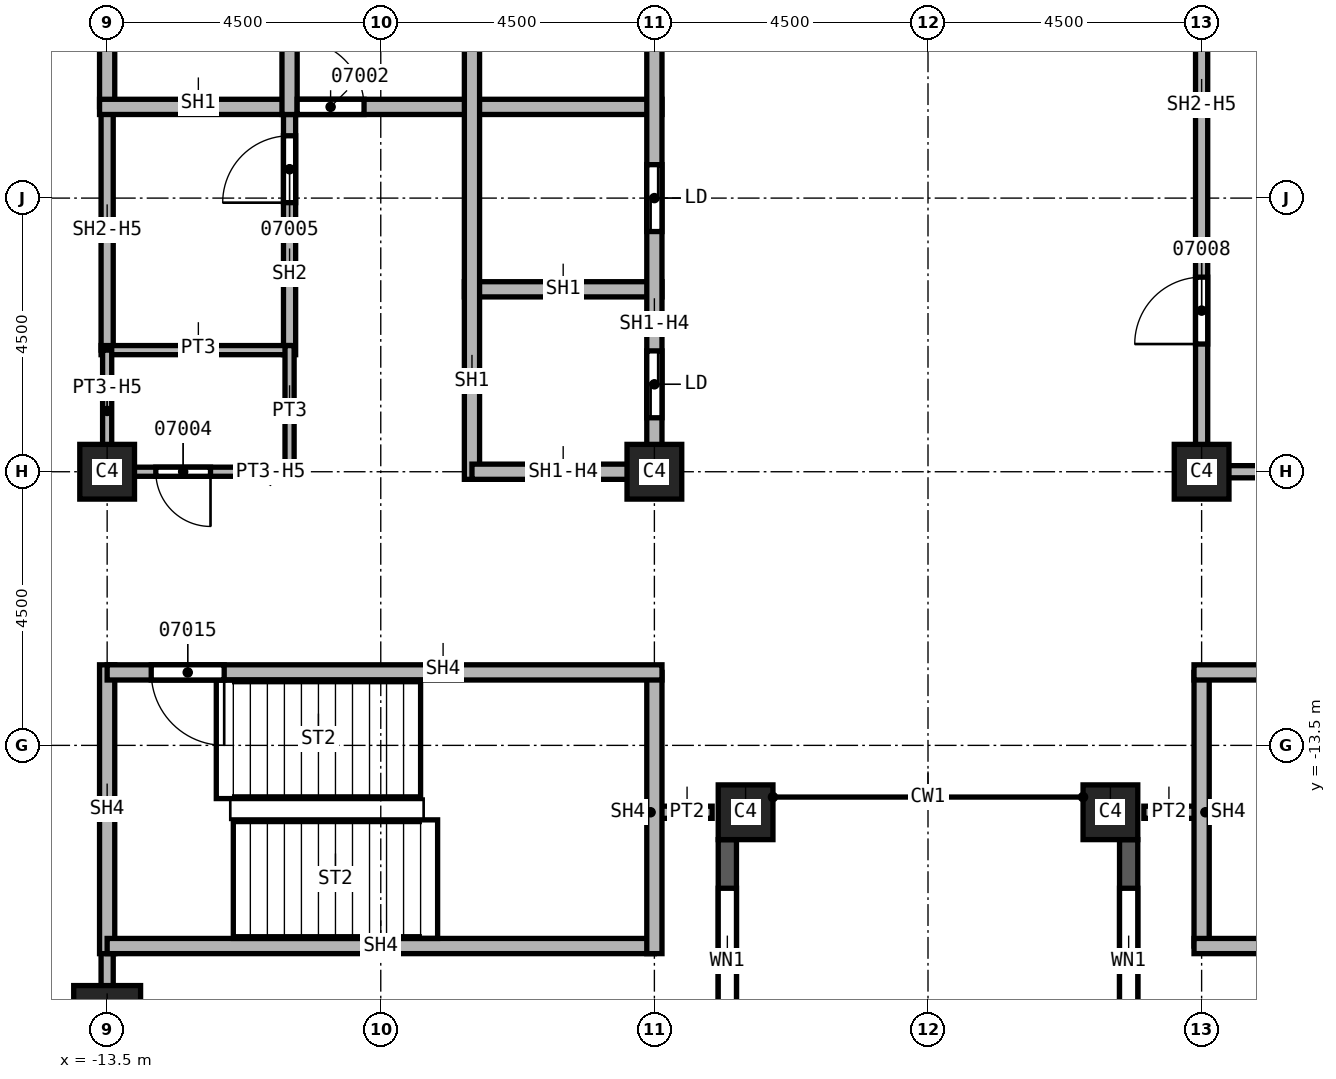
"""IFC4 building model, lengths in metres.
Left out: names, types, materials, properties, quantities, classifications, styles, units other than length and angle.
Written with IfcOpenShell. Run it as: python <this file> out.ifc"""

import sys

from ifc_helpers import new_model, si_unit, direction, frame, frame_2d, origin, origin_2d, place, context, subcontext, project, spatial, rectangle, extrude, element, fill, save


model = new_model("IFC4")
c1 = context("Model", 3, precision=1e-05, world=origin(), true_north=direction((0.0, 1.0)))
c2 = subcontext(c1, "Body", "Model", "MODEL_VIEW")
j1 = project(units=[si_unit("LENGTHUNIT", "METRE"), si_unit("PLANEANGLEUNIT", "RADIAN")], contexts=[c1])
p1 = place(None, origin())
s1 = spatial("IfcSite", under=j1, at=p1, CompositionType="ELEMENT")
p2 = place(p1, origin())
s2 = spatial("IfcBuilding", under=s1, at=p2, CompositionType="ELEMENT")
p3 = place(p2, frame((0.0, 0.0, 138.0)))
s3 = spatial("IfcBuildingStorey", under=s2, at=p3, CompositionType="ELEMENT", Elevation=138.0)
p4 = place(p3, frame((-13.5, -18.0, 0.0), z_axis=(0.0, 0.0, 1.0), x_axis=(1.0, 0.0, 0.0)))
e1 = element("IfcColumn", 1, at=p4, inside=s3, PredefinedType="COLUMN", context=c2, shape_type="SweptSolid", body=[
    extrude(rectangle(XDim=1.1, YDim=1.1, at=origin_2d()), origin(), (0.0, 0.0, 1.0), 3.7),
])
for number, where, z_axis, x_axis in (
    (2, (4.5, -9.0, 0.0), (0.0, 0.0, 1.0), (1.0, 0.0, 0.0)),
    (3, (-4.5, -9.0, 0.0), (0.0, 0.0, 1.0), (1.0, 0.0, 0.0)),
    (4, (-13.5, -9.0, 0.0), (0.0, 0.0, 1.0), (1.0, 0.0, 0.0)),
    (5, (3.0, -14.6, 0.0), (0.0, 0.0, 1.0), (1.0, 0.0, 0.0)),
    (6, (-3.0, -14.6, 0.0), (0.0, 0.0, 1.0), (1.0, 0.0, 0.0)),
):
    element("IfcColumn", number, at=place(p3, frame(where, z_axis=z_axis, x_axis=x_axis)), inside=s3, PredefinedType="COLUMN", context=c2, shape_type="SweptSolid", body=[
        extrude(rectangle(XDim=0.9, YDim=0.9, at=origin_2d()), origin(), (0.0, 0.0, 1.0), 3.7),
    ])
p5 = place(p3, frame((-3.3, -23.05, 0.0), z_axis=(0.0, 0.0, 1.0), x_axis=(0.0, 1.0, 0.0)))
e7 = element("IfcWall", 7, at=p5, inside=s3, PredefinedType="SOLIDWALL", context=c2, shape_type="SweptSolid", body=[
    extrude(rectangle(XDim=8.0, YDim=0.3, at=frame_2d((4.0, 0.0))), origin(), (0.0, 0.0, 1.0), 3.1),
])
p6 = place(p5, frame((0.8, 0.0, 0.8)))
e8 = element("IfcOpeningElement", 8, at=p6, cuts=e7, PredefinedType="OPENING", context=c2, shape_type="SweptSolid", body=[
    extrude(rectangle(XDim=2.4, YDim=1.95, at=frame_2d((1.2, 0.975))), frame((0.0, 0.15, 0.0), z_axis=(0.0, -1.0, 0.0), x_axis=(1.0, 0.0, 0.0)), (0.0, 0.0, 1.0), 0.3),
])
p7 = place(p5, frame((4.8, 0.0, 0.8)))
e9 = element("IfcOpeningElement", 9, at=p7, cuts=e7, PredefinedType="OPENING", context=c2, shape_type="SweptSolid", body=[
    extrude(rectangle(XDim=2.4, YDim=1.95, at=frame_2d((1.2, 0.975))), frame((0.0, 0.15, 0.0), z_axis=(0.0, -1.0, 0.0), x_axis=(1.0, 0.0, 0.0)), (0.0, 0.0, 1.0), 0.3),
])
p8 = place(p3, frame((3.3, -15.05, 0.0), z_axis=(0.0, 0.0, 1.0), x_axis=(0.0, -1.0, 0.0)))
e10 = element("IfcWall", 10, at=p8, inside=s3, PredefinedType="SOLIDWALL", context=c2, shape_type="SweptSolid", body=[
    extrude(rectangle(XDim=8.0, YDim=0.3, at=frame_2d((4.0, 0.0))), origin(), (0.0, 0.0, 1.0), 3.1),
])
p9 = place(p8, frame((0.8, 0.0, 0.8)))
e11 = element("IfcOpeningElement", 11, at=p9, cuts=e10, PredefinedType="OPENING", context=c2, shape_type="SweptSolid", body=[
    extrude(rectangle(XDim=2.4, YDim=1.95, at=frame_2d((1.2, 0.975))), frame((0.0, 0.15, 0.0), z_axis=(0.0, -1.0, 0.0), x_axis=(1.0, 0.0, 0.0)), (0.0, 0.0, 1.0), 0.3),
])
p10 = place(p8, frame((4.8, 0.0, 0.8)))
e12 = element("IfcOpeningElement", 12, at=p10, cuts=e10, PredefinedType="OPENING", context=c2, shape_type="SweptSolid", body=[
    extrude(rectangle(XDim=2.4, YDim=1.95, at=frame_2d((1.2, 0.975))), frame((0.0, 0.15, 0.0), z_axis=(0.0, -1.0, 0.0), x_axis=(1.0, 0.0, 0.0)), (0.0, 0.0, 1.0), 0.3),
])
p11 = place(p3, frame((-13.5, -16.675, 0.0), z_axis=(0.0, 0.0, 1.0), x_axis=(0.0, -1.0, 0.0)))
e13 = element("IfcWall", 13, at=p11, inside=s3, PredefinedType="PARTITIONING", context=c2, shape_type="SweptSolid", body=[
    extrude(rectangle(XDim=6.375, YDim=0.2, at=frame_2d((3.188, 0.0))), origin(), (0.0, 0.0, 1.0), 3.7),
])
p12 = place(p11, frame((2.65, 0.0, 0.0)))
e14 = element("IfcOpeningElement", 14, at=p12, cuts=e13, PredefinedType="OPENING", context=c2, shape_type="SweptSolid", body=[
    extrude(rectangle(XDim=1.0, YDim=2.1, at=frame_2d((0.5, 1.05))), frame((0.0, 0.1, 0.0), z_axis=(0.0, -1.0, 0.0), x_axis=(1.0, 0.0, 0.0)), (0.0, 0.0, 1.0), 0.2),
])
for number, where, z_axis, x_axis in (
    (15, (-3.55, -14.6, 0.0), (0.0, 0.0, 1.0), (-1.0, 0.0, 0.0)),
    (16, (4.5, -14.6, 0.0), (0.0, 0.0, 1.0), (-1.0, 0.0, 0.0)),
):
    element("IfcWall", number, at=place(p3, frame(where, z_axis=z_axis, x_axis=x_axis)), inside=s3, PredefinedType="PARTITIONING", context=c2, shape_type="SweptSolid", body=[
        extrude(rectangle(XDim=0.95, YDim=0.2, at=frame_2d((0.475, 0.0))), origin(), (0.0, 0.0, 1.0), 3.7),
    ])
p13 = place(p3, frame((-13.5, -7.0, 0.0), z_axis=(0.0, 0.0, 1.0), x_axis=(0.0, 1.0, 0.0)))
e17 = element("IfcWall", 17, at=p13, inside=s3, PredefinedType="SOLIDWALL", context=c2, shape_type="SweptSolid", body=[
    extrude(rectangle(XDim=4.0, YDim=0.2, at=frame_2d((2.0, 0.0))), origin(), (0.0, 0.0, 1.0), 2.938),
])
p14 = place(p3, frame((-10.5, -7.075, 0.0), z_axis=(0.0, 0.0, 1.0), x_axis=(0.0, 1.0, 0.0)))
e18 = element("IfcWall", 18, at=p14, inside=s3, PredefinedType="SOLIDWALL", context=c2, shape_type="SweptSolid", body=[
    extrude(rectangle(XDim=4.2, YDim=0.2, at=frame_2d((2.1, 0.0))), origin(), (0.0, 0.0, 1.0), 3.7),
])
p15 = place(p14, frame((2.5, 0.0, 0.0)))
e19 = element("IfcOpeningElement", 19, at=p15, cuts=e18, PredefinedType="OPENING", context=c2, shape_type="SweptSolid", body=[
    extrude(rectangle(XDim=1.1, YDim=2.1, at=frame_2d((0.55, 1.05))), frame((0.0, 0.1, 0.0), z_axis=(0.0, -1.0, 0.0), x_axis=(1.0, 0.0, 0.0)), (0.0, 0.0, 1.0), 0.2),
])
p16 = place(p3, frame((4.5, -9.1, 0.0), z_axis=(0.0, 0.0, 1.0), x_axis=(0.0, 1.0, 0.0)))
e20 = element("IfcWall", 20, at=p16, inside=s3, PredefinedType="SOLIDWALL", context=c2, shape_type="SweptSolid", body=[
    extrude(rectangle(XDim=9.1, YDim=0.2, at=frame_2d((4.55, 0.0))), origin(), (0.0, 0.0, 1.0), 2.938),
])
p17 = place(p16, frame((2.2, 0.0, 0.0)))
e21 = element("IfcOpeningElement", 21, at=p17, cuts=e20, PredefinedType="OPENING", context=c2, shape_type="SweptSolid", body=[
    extrude(rectangle(XDim=1.1, YDim=2.1, at=frame_2d((0.55, 1.05))), frame((0.0, 0.1, 0.0), z_axis=(0.0, -1.0, 0.0), x_axis=(1.0, 0.0, 0.0)), (0.0, 0.0, 1.0), 0.2),
])
p18 = place(p3, frame((7.5, -9.0, 0.0), z_axis=(0.0, 0.0, 1.0), x_axis=(-1.0, 0.0, 0.0)))
e22 = element("IfcWall", 22, at=p18, inside=s3, PredefinedType="SOLIDWALL", context=c2, shape_type="SweptSolid", body=[
    extrude(rectangle(XDim=3.0, YDim=0.2, at=frame_2d((1.5, 0.0))), origin(), (0.0, 0.0, 1.0), 2.938),
])
p19 = place(p3, frame((-13.5, -3.0, 0.0), z_axis=(0.0, 0.0, 1.0), x_axis=(0.0, 1.0, 0.0)))
e23 = element("IfcWall", 23, at=p19, inside=s3, PredefinedType="SOLIDWALL", context=c2, shape_type="SweptSolid", body=[
    extrude(rectangle(XDim=6.0, YDim=0.25, at=frame_2d((3.0, 0.0))), origin(), (0.0, 0.0, 1.0), 2.938),
])
p20 = place(p3, frame((-13.625, -3.0, 0.0), z_axis=(0.0, 0.0, 1.0), x_axis=(1.0, 0.0, 0.0)))
e24 = element("IfcWall", 24, at=p20, inside=s3, PredefinedType="SOLIDWALL", context=c2, shape_type="SweptSolid", body=[
    extrude(rectangle(XDim=9.25, YDim=0.25, at=frame_2d((4.625, 0.0))), origin(), (0.0, 0.0, 1.0), 3.7),
])
p21 = place(p20, frame((3.25, 0.0, 0.0)))
e25 = element("IfcOpeningElement", 25, at=p21, cuts=e24, PredefinedType="OPENING", context=c2, shape_type="SweptSolid", body=[
    extrude(rectangle(XDim=1.1, YDim=2.1, at=frame_2d((0.55, 1.05))), frame((0.0, 0.125, 0.0), z_axis=(0.0, -1.0, 0.0), x_axis=(1.0, 0.0, 0.0)), (0.0, 0.0, 1.0), 0.25),
])
p22 = place(p3, frame((-10.5, -3.125, 0.0), z_axis=(0.0, 0.0, 1.0), x_axis=(0.0, 1.0, 0.0)))
e26 = element("IfcWall", 26, at=p22, inside=s3, PredefinedType="SOLIDWALL", context=c2, shape_type="SweptSolid", body=[
    extrude(rectangle(XDim=6.25, YDim=0.25, at=frame_2d((3.125, 0.0))), origin(), (0.0, 0.0, 1.0), 3.7),
])
p23 = place(p22, frame((1.075, 0.0, 0.0)))
e27 = element("IfcOpeningElement", 27, at=p23, cuts=e26, PredefinedType="OPENING", context=c2, shape_type="SweptSolid", body=[
    extrude(rectangle(XDim=1.1, YDim=2.1, at=frame_2d((0.55, 1.05))), frame((0.0, 0.125, 0.0), z_axis=(0.0, -1.0, 0.0), x_axis=(1.0, 0.0, 0.0)), (0.0, 0.0, 1.0), 0.25),
])
p24 = place(p22, frame((4.075, 0.0, 0.0)))
e28 = element("IfcOpeningElement", 28, at=p24, cuts=e26, PredefinedType="OPENING", context=c2, shape_type="SweptSolid", body=[
    extrude(rectangle(XDim=1.1, YDim=2.1, at=frame_2d((0.55, 1.05))), frame((0.0, 0.125, 0.0), z_axis=(0.0, -1.0, 0.0), x_axis=(1.0, 0.0, 0.0)), (0.0, 0.0, 1.0), 0.25),
])
p25 = place(p3, frame((-7.625, -6.0, 0.0), z_axis=(0.0, 0.0, 1.0), x_axis=(1.0, 0.0, 0.0)))
e29 = element("IfcWall", 29, at=p25, inside=s3, PredefinedType="SOLIDWALL", context=c2, shape_type="SweptSolid", body=[
    extrude(rectangle(XDim=3.25, YDim=0.25, at=frame_2d((1.625, 0.0))), origin(), (0.0, 0.0, 1.0), 3.7),
])
p26 = place(p3, frame((-7.5, -9.125, 0.0), z_axis=(0.0, 0.0, 1.0), x_axis=(0.0, 1.0, 0.0)))
e30 = element("IfcWall", 30, at=p26, inside=s3, PredefinedType="SOLIDWALL", context=c2, shape_type="SweptSolid", body=[
    extrude(rectangle(XDim=12.25, YDim=0.25, at=frame_2d((6.125, 0.0))), origin(), (0.0, 0.0, 1.0), 3.7),
])
p27 = place(p3, frame((-4.5, -9.0, 0.0), z_axis=(0.0, 0.0, 1.0), x_axis=(-1.0, 0.0, 0.0)))
e31 = element("IfcWall", 31, at=p27, inside=s3, PredefinedType="SOLIDWALL", context=c2, shape_type="SweptSolid", body=[
    extrude(rectangle(XDim=3.0, YDim=0.25, at=frame_2d((1.5, 0.0))), origin(), (0.0, 0.0, 1.0), 2.938),
])
p28 = place(p3, frame((-4.5, 0.0, 0.0), z_axis=(0.0, 0.0, 1.0), x_axis=(0.0, -1.0, 0.0)))
e32 = element("IfcWall", 32, at=p28, inside=s3, PredefinedType="SOLIDWALL", context=c2, shape_type="SweptSolid", body=[
    extrude(rectangle(XDim=9.125, YDim=0.25, at=frame_2d((4.562, 0.0))), origin(), (0.0, 0.0, 1.0), 2.938),
])
p29 = place(p28, frame((7.012, 0.0, 0.0)))
e33 = element("IfcOpeningElement", 33, at=p29, cuts=e32, PredefinedType="OPENING", context=c2, shape_type="SweptSolid", body=[
    extrude(rectangle(XDim=1.1, YDim=2.1, at=frame_2d((0.55, 1.05))), frame((0.0, 0.125, 0.0), z_axis=(0.0, -1.0, 0.0), x_axis=(1.0, 0.0, 0.0)), (0.0, 0.0, 1.0), 0.25),
])
p30 = place(p28, frame((3.95, 0.0, 0.0)))
e34 = element("IfcOpeningElement", 34, at=p30, cuts=e32, PredefinedType="OPENING", context=c2, shape_type="SweptSolid", body=[
    extrude(rectangle(XDim=1.1, YDim=2.1, at=frame_2d((0.55, 1.05))), frame((0.0, 0.125, 0.0), z_axis=(0.0, -1.0, 0.0), x_axis=(1.0, 0.0, 0.0)), (0.0, 0.0, 1.0), 0.25),
])
p31 = place(p28, frame((0.95, 0.0, 0.0)))
e35 = element("IfcOpeningElement", 35, at=p31, cuts=e32, PredefinedType="OPENING", context=c2, shape_type="SweptSolid", body=[
    extrude(rectangle(XDim=1.1, YDim=2.1, at=frame_2d((0.55, 1.05))), frame((0.0, 0.125, 0.0), z_axis=(0.0, -1.0, 0.0), x_axis=(1.0, 0.0, 0.0)), (0.0, 0.0, 1.0), 0.25),
])
p32 = place(p3, frame((-13.5, -12.175, 0.0), z_axis=(0.0, 0.0, 1.0), x_axis=(0.0, -1.0, 0.0)))
e36 = element("IfcWall", 36, at=p32, inside=s3, PredefinedType="SOLIDWALL", context=c2, shape_type="SweptSolid", body=[
    extrude(rectangle(XDim=4.75, YDim=0.25, at=frame_2d((2.375, 0.0))), origin(), (0.0, 0.0, 1.0), 3.7),
])
p33 = place(p3, frame((-4.5, -16.8, 0.0), z_axis=(0.0, 0.0, 1.0), x_axis=(-1.0, 0.0, 0.0)))
e37 = element("IfcWall", 37, at=p33, inside=s3, PredefinedType="SOLIDWALL", context=c2, shape_type="SweptSolid", body=[
    extrude(rectangle(XDim=9.0, YDim=0.25, at=frame_2d((4.5, 0.0))), origin(), (0.0, 0.0, 1.0), 3.7),
])
p34 = place(p3, frame((-4.5, -12.3, 0.0), z_axis=(0.0, 0.0, 1.0), x_axis=(0.0, -1.0, 0.0)))
e38 = element("IfcWall", 38, at=p34, inside=s3, PredefinedType="SOLIDWALL", context=c2, shape_type="SweptSolid", body=[
    extrude(rectangle(XDim=4.625, YDim=0.25, at=frame_2d((2.312, 0.0))), origin(), (0.0, 0.0, 1.0), 3.7),
])
p35 = place(p3, frame((-4.375, -12.3, 0.0), z_axis=(0.0, 0.0, 1.0), x_axis=(-1.0, 0.0, 0.0)))
e39 = element("IfcWall", 39, at=p35, inside=s3, PredefinedType="SOLIDWALL", context=c2, shape_type="SweptSolid", body=[
    extrude(rectangle(XDim=9.125, YDim=0.25, at=frame_2d((4.562, 0.0))), origin(), (0.0, 0.0, 1.0), 3.7),
])
p36 = place(p35, frame((7.2, 0.0, 0.0)))
e40 = element("IfcOpeningElement", 40, at=p36, cuts=e39, PredefinedType="OPENING", context=c2, shape_type="SweptSolid", body=[
    extrude(rectangle(XDim=1.2, YDim=2.1, at=frame_2d((0.6, 1.05))), frame((0.0, 0.125, 0.0), z_axis=(0.0, -1.0, 0.0), x_axis=(1.0, 0.0, 0.0)), (0.0, 0.0, 1.0), 0.25),
])
p37 = place(p3, frame((4.5, -16.8, 0.0), z_axis=(0.0, 0.0, 1.0), x_axis=(0.0, 1.0, 0.0)))
e41 = element("IfcWall", 41, at=p37, inside=s3, PredefinedType="SOLIDWALL", context=c2, shape_type="SweptSolid", body=[
    extrude(rectangle(XDim=4.5, YDim=0.25, at=frame_2d((2.25, 0.0))), origin(), (0.0, 0.0, 1.0), 3.7),
])
p38 = place(p3, frame((13.5, -16.8, 0.0), z_axis=(0.0, 0.0, 1.0), x_axis=(-1.0, 0.0, 0.0)))
e42 = element("IfcWall", 42, at=p38, inside=s3, PredefinedType="SOLIDWALL", context=c2, shape_type="SweptSolid", body=[
    extrude(rectangle(XDim=9.125, YDim=0.25, at=frame_2d((4.562, 0.0))), origin(), (0.0, 0.0, 1.0), 3.7),
])
p39 = place(p3, frame((13.5, -12.3, 0.0), z_axis=(0.0, 0.0, 1.0), x_axis=(-1.0, 0.0, 0.0)))
e43 = element("IfcWall", 43, at=p39, inside=s3, PredefinedType="SOLIDWALL", context=c2, shape_type="SweptSolid", body=[
    extrude(rectangle(XDim=9.125, YDim=0.25, at=frame_2d((4.562, 0.0))), origin(), (0.0, 0.0, 1.0), 3.7),
])
p40 = place(p39, frame((0.6, 0.0, 0.0)))
e44 = element("IfcOpeningElement", 44, at=p40, cuts=e43, PredefinedType="OPENING", context=c2, shape_type="SweptSolid", body=[
    extrude(rectangle(XDim=1.2, YDim=2.1, at=frame_2d((0.6, 1.05))), frame((0.0, 0.125, 0.0), z_axis=(0.0, -1.0, 0.0), x_axis=(1.0, 0.0, 0.0)), (0.0, 0.0, 1.0), 0.25),
])
p41 = place(p3, frame((-13.6, -7.0, 0.0), z_axis=(0.0, 0.0, 1.0), x_axis=(1.0, 0.0, 0.0)))
e45 = element("IfcWall", 45, at=p41, inside=s3, PredefinedType="PARTITIONING", context=c2, shape_type="SweptSolid", body=[
    extrude(rectangle(XDim=3.1, YDim=0.15, at=frame_2d((1.55, 0.0))), origin(), (0.0, 0.0, 1.0), 3.7),
])
p42 = place(p3, frame((-13.5, -9.075, 0.0), z_axis=(0.0, 0.0, 1.0), x_axis=(0.0, 1.0, 0.0)))
e46 = element("IfcWall", 46, at=p42, inside=s3, PredefinedType="PARTITIONING", context=c2, shape_type="SweptSolid", body=[
    extrude(rectangle(XDim=2.075, YDim=0.15, at=frame_2d((1.038, 0.0))), origin(), (0.0, 0.0, 1.0), 2.938),
])
p43 = place(p3, frame((-10.5, -9.075, 0.0), z_axis=(0.0, 0.0, 1.0), x_axis=(0.0, 1.0, 0.0)))
e47 = element("IfcWall", 47, at=p43, inside=s3, PredefinedType="PARTITIONING", context=c2, shape_type="SweptSolid", body=[
    extrude(rectangle(XDim=2.15, YDim=0.15, at=frame_2d((1.075, 0.0))), origin(), (0.0, 0.0, 1.0), 3.7),
])
p44 = place(p3, frame((-10.5, -9.0, 0.0), z_axis=(0.0, 0.0, 1.0), x_axis=(-1.0, 0.0, 0.0)))
e48 = element("IfcWall", 48, at=p44, inside=s3, PredefinedType="PARTITIONING", context=c2, shape_type="SweptSolid", body=[
    extrude(rectangle(XDim=3.0, YDim=0.15, at=frame_2d((1.5, 0.0))), origin(), (0.0, 0.0, 1.0), 2.938),
])
p45 = place(p44, frame((1.3, 0.0, 0.0)))
e49 = element("IfcOpeningElement", 49, at=p45, cuts=e48, PredefinedType="OPENING", context=c2, shape_type="SweptSolid", body=[
    extrude(rectangle(XDim=0.9, YDim=2.1, at=frame_2d((0.45, 1.05))), frame((0.0, 0.075, 0.0), z_axis=(0.0, -1.0, 0.0), x_axis=(1.0, 0.0, 0.0)), (0.0, 0.0, 1.0), 0.15),
])
p46 = place(p7, origin())
e50 = element("IfcWindow", 50, at=p46, inside=s3, PartitioningType="SINGLE_PANEL", PredefinedType="WINDOW", context=c2, shape_type="SweptSolid", body=[
    extrude(rectangle(XDim=2.4, YDim=1.95, at=frame_2d((1.2, 0.975))), frame((0.0, 0.03, 0.0), z_axis=(0.0, -1.0, 0.0), x_axis=(1.0, 0.0, 0.0)), (0.0, 0.0, 1.0), 0.06),
])
fill(e9, e50)
p47 = place(p9, origin())
e51 = element("IfcWindow", 51, at=p47, inside=s3, PartitioningType="SINGLE_PANEL", PredefinedType="WINDOW", context=c2, shape_type="SweptSolid", body=[
    extrude(rectangle(XDim=2.4, YDim=1.95, at=frame_2d((1.2, 0.975))), frame((0.0, 0.03, 0.0), z_axis=(0.0, -1.0, 0.0), x_axis=(1.0, 0.0, 0.0)), (0.0, 0.0, 1.0), 0.06),
])
fill(e11, e51)
p48 = place(p21, origin())
e52 = element("IfcDoor", 52, at=p48, inside=s3, OperationType="SINGLE_SWING_LEFT", PredefinedType="DOOR", context=c2, shape_type="SweptSolid", body=[
    extrude(rectangle(XDim=1.1, YDim=2.1, at=frame_2d((0.55, 1.05))), frame((0.0, 0.025, 0.0), z_axis=(0.0, -1.0, 0.0), x_axis=(1.0, 0.0, 0.0)), (0.0, 0.0, 1.0), 0.05),
])
fill(e25, e52)
p49 = place(p45, origin())
e53 = element("IfcDoor", 53, at=p49, inside=s3, OperationType="SINGLE_SWING_LEFT", PredefinedType="DOOR", context=c2, shape_type="SweptSolid", body=[
    extrude(rectangle(XDim=0.9, YDim=2.1, at=frame_2d((0.45, 1.05))), frame((0.0, 0.025, 0.0), z_axis=(0.0, -1.0, 0.0), x_axis=(1.0, 0.0, 0.0)), (0.0, 0.0, 1.0), 0.05),
])
fill(e49, e53)
p50 = place(p15, origin())
e54 = element("IfcDoor", 54, at=p50, inside=s3, OperationType="SINGLE_SWING_RIGHT", PredefinedType="DOOR", context=c2, shape_type="SweptSolid", body=[
    extrude(rectangle(XDim=1.1, YDim=2.1, at=frame_2d((0.55, 1.05))), frame((0.0, 0.025, 0.0), z_axis=(0.0, -1.0, 0.0), x_axis=(1.0, 0.0, 0.0)), (0.0, 0.0, 1.0), 0.05),
])
fill(e19, e54)
p51 = place(p17, origin())
e55 = element("IfcDoor", 55, at=p51, inside=s3, OperationType="SINGLE_SWING_LEFT", PredefinedType="DOOR", context=c2, shape_type="SweptSolid", body=[
    extrude(rectangle(XDim=1.1, YDim=2.1, at=frame_2d((0.55, 1.05))), frame((0.0, 0.025, 0.0), z_axis=(0.0, -1.0, 0.0), x_axis=(1.0, 0.0, 0.0)), (0.0, 0.0, 1.0), 0.05),
])
fill(e21, e55)
p52 = place(p36, origin())
e56 = element("IfcDoor", 56, at=p52, inside=s3, OperationType="SINGLE_SWING_RIGHT", PredefinedType="DOOR", context=c2, shape_type="SweptSolid", body=[
    extrude(rectangle(XDim=1.2, YDim=2.1, at=frame_2d((0.6, 1.05))), frame((0.0, 0.025, 0.0), z_axis=(0.0, -1.0, 0.0), x_axis=(1.0, 0.0, 0.0)), (0.0, 0.0, 1.0), 0.05),
])
fill(e40, e56)
p53 = place(p29, origin())
e57 = element("IfcDoor", 57, at=p53, inside=s3, OperationType="SLIDING_TO_LEFT", PredefinedType="DOOR", context=c2, shape_type="SweptSolid", body=[
    extrude(rectangle(XDim=1.1, YDim=2.1, at=frame_2d((0.55, 1.05))), frame((0.0, 0.025, 0.0), z_axis=(0.0, -1.0, 0.0), x_axis=(1.0, 0.0, 0.0)), (0.0, 0.0, 1.0), 0.05),
])
fill(e33, e57)
p54 = place(p30, origin())
e58 = element("IfcDoor", 58, at=p54, inside=s3, OperationType="SLIDING_TO_LEFT", PredefinedType="DOOR", context=c2, shape_type="SweptSolid", body=[
    extrude(rectangle(XDim=1.1, YDim=2.1, at=frame_2d((0.55, 1.05))), frame((0.0, 0.025, 0.0), z_axis=(0.0, -1.0, 0.0), x_axis=(1.0, 0.0, 0.0)), (0.0, 0.0, 1.0), 0.05),
])
fill(e34, e58)
save(model, sys.argv[1])
